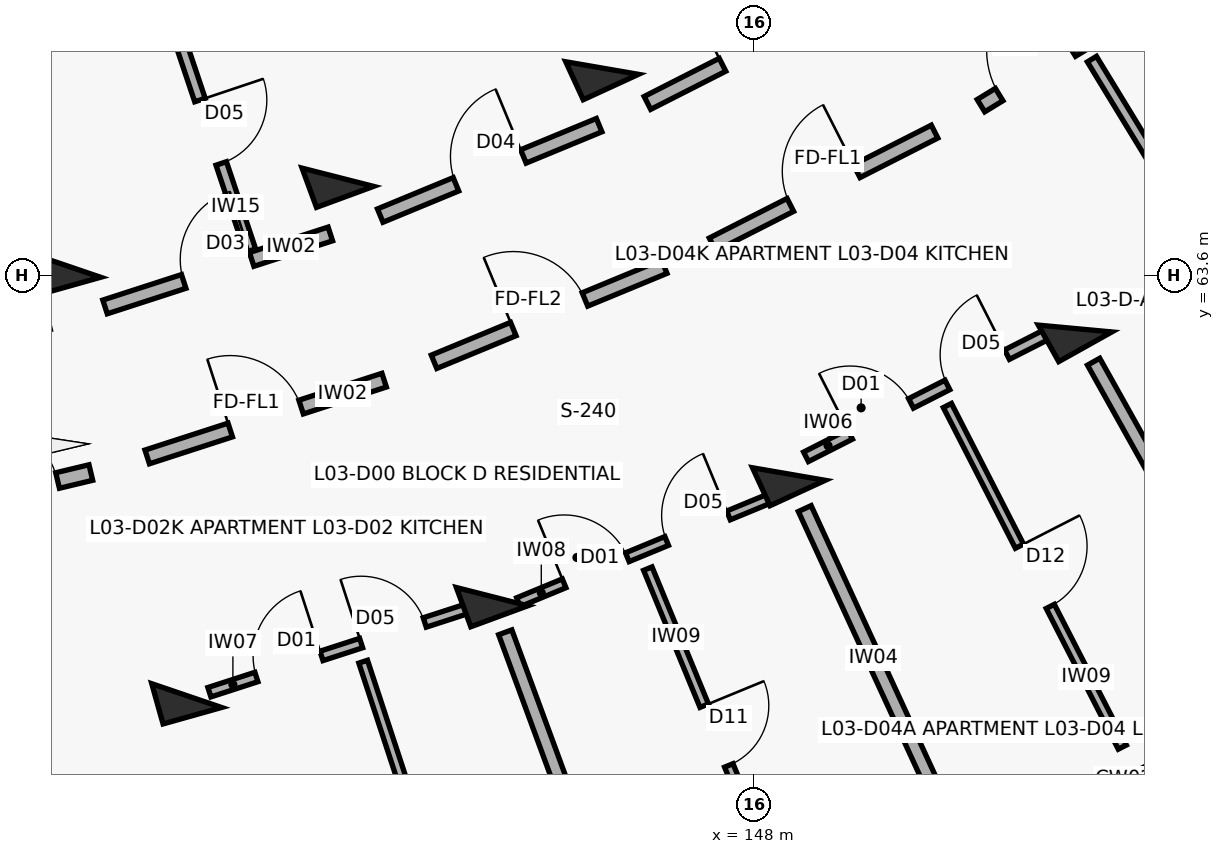
"""IFC4 building model, lengths in metres.
Left out: names, types, materials, properties, quantities, classifications, styles, units other than length and angle.
Written with IfcOpenShell. Run it as: python <this file> out.ifc"""

import sys

from ifc_helpers import new_model, si_unit, direction, frame, frame_2d, origin, origin_2d, place, context, subcontext, project, spatial, rectangle, extrude, element, fill, save


model = new_model("IFC4")
c1 = context("Model", 3, precision=1e-05, world=origin(), true_north=direction((0.0, 1.0)))
c2 = subcontext(c1, "Body", "Model", "MODEL_VIEW")
j1 = project(units=[si_unit("LENGTHUNIT", "METRE"), si_unit("PLANEANGLEUNIT", "RADIAN")], contexts=[c1])
p1 = place(None, origin())
s1 = spatial("IfcSite", under=j1, at=p1, CompositionType="ELEMENT")
p2 = place(p1, origin())
s2 = spatial("IfcBuilding", under=s1, at=p2, CompositionType="ELEMENT")
p3 = place(p2, frame((0.0, 0.0, 11.2)))
s3 = spatial("IfcBuildingStorey", under=s2, at=p3, CompositionType="ELEMENT", Elevation=11.2)
for number, where, z_axis, x_axis in (
    (1, (138.947, 63.728, 0.0), (0.0, 0.0, 1.0), (0.271, -0.963, 0.0)),
    (2, (140.538, 58.067, 0.0), (0.0, 0.0, 1.0), (0.271, -0.963, 0.0)),
    (3, (142.527, 64.887, 0.0), (0.0, 0.0, 1.0), (0.345, -0.938, 0.0)),
    (4, (144.557, 59.369, 0.0), (0.0, 0.0, 1.0), (0.345, -0.938, 0.0)),
    (5, (146.004, 66.324, 0.0), (0.0, 0.0, 1.0), (0.418, -0.909, 0.0)),
    (6, (148.461, 60.982, 0.0), (0.0, 0.0, 1.0), (0.418, -0.909, 0.0)),
    (7, (152.227, 62.897, 0.0), (0.0, 0.0, 1.0), (0.488, -0.873, 0.0)),
):
    element("IfcColumn", number, at=place(p3, frame(where, z_axis=z_axis, x_axis=x_axis)), inside=s3, PredefinedType="COLUMN", context=c2, shape_type="SweptSolid", body=[
        extrude(rectangle(XDim=0.55, YDim=0.8, at=origin_2d()), origin(), (0.0, 0.0, 1.0), 3.1),
    ])
p4 = place(p3, frame((136.227, 60.272, 0.0), z_axis=(0.0, 0.0, 1.0), x_axis=(0.972564346632, 0.232634029456, 0.0)))
e8 = element("IfcWall", 8, at=p4, inside=s3, PredefinedType="SOLIDWALL", context=c2, shape_type="SweptSolid", body=[
    extrude(rectangle(XDim=3.137, YDim=0.21, at=frame_2d((1.568, 0.0))), origin(), (0.0, 0.0, 1.0), 2.08),
])
p5 = place(p4, frame((0.45, 0.0, 0.0)))
e9 = element("IfcOpeningElement", 9, at=p5, cuts=e8, PredefinedType="OPENING", context=c2, shape_type="SweptSolid", body=[
    extrude(rectangle(XDim=1.1, YDim=2.15, at=frame_2d((0.55, 1.075))), frame((0.0, 0.115, 0.0), z_axis=(0.0, -1.0, 0.0), x_axis=(1.0, 0.0, 0.0)), (0.0, 0.0, 1.0), 0.23),
])
p6 = place(p4, frame((1.567, 0.0, 0.0)))
e10 = element("IfcOpeningElement", 10, at=p6, cuts=e8, PredefinedType="OPENING", context=c2, shape_type="SweptSolid", body=[
    extrude(rectangle(XDim=1.12, YDim=2.15, at=frame_2d((0.56, 1.075))), frame((0.0, 0.115, 0.0), z_axis=(0.0, -1.0, 0.0), x_axis=(1.0, 0.0, 0.0)), (0.0, 0.0, 1.0), 0.23),
])
p7 = place(p3, frame((140.019, 61.208, 0.0), z_axis=(0.0, 0.0, 1.0), x_axis=(0.951323803878, 0.308193154005, 0.0)))
e11 = element("IfcWall", 11, at=p7, inside=s3, PredefinedType="SOLIDWALL", context=c2, shape_type="SweptSolid", body=[
    extrude(rectangle(XDim=3.277, YDim=0.19, at=frame_2d((1.639, 0.0))), origin(), (0.0, 0.0, 1.0), 2.08),
])
p8 = place(p7, frame((1.148, 0.0, 0.0)))
e12 = element("IfcOpeningElement", 12, at=p8, cuts=e11, PredefinedType="OPENING", context=c2, shape_type="SweptSolid", body=[
    extrude(rectangle(XDim=0.98, YDim=2.15, at=frame_2d((0.49, 1.075))), frame((0.0, 0.105, 0.0), z_axis=(0.0, -1.0, 0.0), x_axis=(1.0, 0.0, 0.0)), (0.0, 0.0, 1.0), 0.21),
])
p9 = place(p3, frame((139.464, 63.181, 0.0), z_axis=(0.0, 0.0, 1.0), x_axis=(0.951336474448, 0.308154040027, 0.0)))
e13 = element("IfcWall", 13, at=p9, inside=s3, PredefinedType="SOLIDWALL", context=c2, shape_type="SweptSolid", body=[
    extrude(rectangle(XDim=3.116, YDim=0.19, at=frame_2d((1.558, 0.0))), origin(), (0.0, 0.0, 1.0), 2.08),
])
p10 = place(p9, frame((1.088, 0.0, 0.0)))
e14 = element("IfcOpeningElement", 14, at=p10, cuts=e13, PredefinedType="OPENING", context=c2, shape_type="SweptSolid", body=[
    extrude(rectangle(XDim=0.94, YDim=2.1, at=frame_2d((0.47, 1.05))), frame((0.0, 0.105, 0.0), z_axis=(0.0, -1.0, 0.0), x_axis=(1.0, 0.0, 0.0)), (0.0, 0.0, 1.0), 0.21),
])
p11 = place(p3, frame((140.328, 67.051, 0.0), z_axis=(0.0, 0.0, 1.0), x_axis=(0.317825321803, -0.948149284038, 0.0)))
e15 = element("IfcWall", 15, at=p11, inside=s3, PredefinedType="PARTITIONING", context=c2, shape_type="SweptSolid", body=[
    extrude(rectangle(XDim=3.3, YDim=0.145, at=frame_2d((1.65, 0.0))), origin(), (0.0, 0.0, 1.0), 2.08),
])
p12 = place(p11, frame((1.21, 0.0, 0.0)))
e16 = element("IfcOpeningElement", 16, at=p12, cuts=e15, PredefinedType="OPENING", context=c2, shape_type="SweptSolid", body=[
    extrude(rectangle(XDim=0.88, YDim=2.1, at=frame_2d((0.44, 1.05))), frame((0.0, 0.083, 0.0), z_axis=(0.0, -1.0, 0.0), x_axis=(1.0, 0.0, 0.0)), (0.0, 0.0, 1.0), 0.165),
])
p13 = place(p3, frame((140.837, 58.112, 0.0), z_axis=(0.0, 0.0, 1.0), x_axis=(0.951327366371, 0.308182157164, 0.0)))
e17 = element("IfcWall", 17, at=p13, inside=s3, PredefinedType="PARTITIONING", context=c2, shape_type="SweptSolid", body=[
    extrude(rectangle(XDim=3.628, YDim=0.13, at=frame_2d((1.814, 0.0))), origin(), (0.0, 0.0, 1.0), 2.08),
])
p14 = place(p13, frame((0.65, 0.0, 0.0)))
e18 = element("IfcOpeningElement", 18, at=p14, cuts=e17, PredefinedType="OPENING", context=c2, shape_type="SweptSolid", body=[
    extrude(rectangle(XDim=0.9, YDim=2.1, at=frame_2d((0.45, 1.05))), frame((0.0, 0.075, 0.0), z_axis=(0.0, -1.0, 0.0), x_axis=(1.0, 0.0, 0.0)), (0.0, 0.0, 1.0), 0.15),
])
p15 = place(p13, frame((2.098, 0.0, 0.0)))
e19 = element("IfcOpeningElement", 19, at=p15, cuts=e17, PredefinedType="OPENING", context=c2, shape_type="SweptSolid", body=[
    extrude(rectangle(XDim=0.88, YDim=2.1, at=frame_2d((0.44, 1.05))), frame((0.0, 0.075, 0.0), z_axis=(0.0, -1.0, 0.0), x_axis=(1.0, 0.0, 0.0)), (0.0, 0.0, 1.0), 0.15),
])
p16 = place(p3, frame((142.86, 58.513, 0.0), z_axis=(0.0, 0.0, 1.0), x_axis=(0.312308755556, -0.949980653068, 0.0)))
e20 = element("IfcWall", 20, at=p16, inside=s3, PredefinedType="PARTITIONING", context=c2, shape_type="SweptSolid", body=[
    extrude(rectangle(XDim=4.9, YDim=0.12, at=frame_2d((2.45, 0.0))), origin(), (0.0, 0.0, 1.0), 2.08),
])
p17 = place(p16, frame((1.97, 0.0, 0.0)))
e21 = element("IfcOpeningElement", 21, at=p17, cuts=e20, PredefinedType="OPENING", context=c2, shape_type="SweptSolid", body=[
    extrude(rectangle(XDim=0.96, YDim=2.1, at=frame_2d((0.48, 1.05))), frame((0.0, 0.07, 0.0), z_axis=(0.0, -1.0, 0.0), x_axis=(1.0, 0.0, 0.0)), (0.0, 0.0, 1.0), 0.14),
])
p18 = place(p3, frame((143.793, 62.459, 0.0), z_axis=(0.0, 0.0, 1.0), x_axis=(0.924214561665, 0.381873596896, 0.0)))
e22 = element("IfcWall", 22, at=p18, inside=s3, PredefinedType="SOLIDWALL", context=c2, shape_type="SweptSolid", body=[
    extrude(rectangle(XDim=3.277, YDim=0.19, at=frame_2d((1.639, 0.0))), origin(), (0.0, 0.0, 1.0), 2.08),
])
p19 = place(p18, frame((1.128, 0.0, 0.0)))
e23 = element("IfcOpeningElement", 23, at=p19, cuts=e22, PredefinedType="OPENING", context=c2, shape_type="SweptSolid", body=[
    extrude(rectangle(XDim=1.02, YDim=2.15, at=frame_2d((0.51, 1.075))), frame((0.0, 0.105, 0.0), z_axis=(0.0, -1.0, 0.0), x_axis=(1.0, 0.0, 0.0)), (0.0, 0.0, 1.0), 0.21),
])
p20 = place(p3, frame((143.085, 64.383, 0.0), z_axis=(0.0, 0.0, 1.0), x_axis=(0.924213340202, 0.381876553081, 0.0)))
e24 = element("IfcWall", 24, at=p20, inside=s3, PredefinedType="SOLIDWALL", context=c2, shape_type="SweptSolid", body=[
    extrude(rectangle(XDim=3.116, YDim=0.19, at=frame_2d((1.558, 0.0))), origin(), (0.0, 0.0, 1.0), 2.08),
])
p21 = place(p20, frame((1.078, 0.0, 0.0)))
e25 = element("IfcOpeningElement", 25, at=p21, cuts=e24, PredefinedType="OPENING", context=c2, shape_type="SweptSolid", body=[
    extrude(rectangle(XDim=0.96, YDim=2.1, at=frame_2d((0.48, 1.05))), frame((0.0, 0.105, 0.0), z_axis=(0.0, -1.0, 0.0), x_axis=(1.0, 0.0, 0.0)), (0.0, 0.0, 1.0), 0.21),
])
p22 = place(p3, frame((144.903, 59.296, 0.0), z_axis=(0.0, 0.0, 1.0), x_axis=(0.924207914011, 0.381889685223, 0.0)))
e26 = element("IfcWall", 26, at=p22, inside=s3, PredefinedType="PARTITIONING", context=c2, shape_type="SweptSolid", body=[
    extrude(rectangle(XDim=3.64, YDim=0.125, at=frame_2d((1.82, 0.0))), origin(), (0.0, 0.0, 1.0), 2.08),
])
p23 = place(p22, frame((0.65, 0.0, 0.0)))
e27 = element("IfcOpeningElement", 27, at=p23, cuts=e26, PredefinedType="OPENING", context=c2, shape_type="SweptSolid", body=[
    extrude(rectangle(XDim=0.9, YDim=2.1, at=frame_2d((0.45, 1.05))), frame((0.0, 0.073, 0.0), z_axis=(0.0, -1.0, 0.0), x_axis=(1.0, 0.0, 0.0)), (0.0, 0.0, 1.0), 0.145),
])
p24 = place(p22, frame((2.11, 0.0, 0.0)))
e28 = element("IfcOpeningElement", 28, at=p24, cuts=e26, PredefinedType="OPENING", context=c2, shape_type="SweptSolid", body=[
    extrude(rectangle(XDim=0.88, YDim=2.1, at=frame_2d((0.44, 1.05))), frame((0.0, 0.073, 0.0), z_axis=(0.0, -1.0, 0.0), x_axis=(1.0, 0.0, 0.0)), (0.0, 0.0, 1.0), 0.145),
])
p25 = place(p3, frame((146.605, 59.738, 0.0), z_axis=(0.0, 0.0, 1.0), x_axis=(0.380553327256, -0.924758976769, 0.0)))
e29 = element("IfcWall", 29, at=p25, inside=s3, PredefinedType="PARTITIONING", context=c2, shape_type="SweptSolid", body=[
    extrude(rectangle(XDim=4.75, YDim=0.12, at=frame_2d((2.375, 0.0))), origin(), (0.0, 0.0, 1.0), 2.08),
])
p26 = place(p25, frame((1.95, 0.0, 0.0)))
e30 = element("IfcOpeningElement", 30, at=p26, cuts=e29, PredefinedType="OPENING", context=c2, shape_type="SweptSolid", body=[
    extrude(rectangle(XDim=0.85, YDim=2.1, at=frame_2d((0.425, 1.05))), frame((0.0, 0.07, 0.0), z_axis=(0.0, -1.0, 0.0), x_axis=(1.0, 0.0, 0.0)), (0.0, 0.0, 1.0), 0.14),
])
p27 = place(p3, frame((144.73, 58.9, 0.0), z_axis=(0.0, 0.0, 1.0), x_axis=(0.345273579683, -0.938502080537, 0.0)))
e31 = element("IfcWall", 31, at=p27, inside=s3, PredefinedType="SOLIDWALL", context=c2, shape_type="SweptSolid", body=[
    extrude(rectangle(XDim=4.35, YDim=0.185, at=frame_2d((2.175, 0.0))), origin(), (0.0, 0.0, 1.0), 2.08),
])
p28 = place(p3, frame((147.457, 64.003, 0.0), z_axis=(0.0, 0.0, 1.0), x_axis=(0.891412167565, 0.45319349898, 0.0)))
e32 = element("IfcWall", 32, at=p28, inside=s3, PredefinedType="SOLIDWALL", context=c2, shape_type="SweptSolid", body=[
    extrude(rectangle(XDim=3.277, YDim=0.19, at=frame_2d((1.639, 0.0))), origin(), (0.0, 0.0, 1.0), 2.08),
])
p29 = place(p28, frame((1.148, 0.0, 0.0)))
e33 = element("IfcOpeningElement", 33, at=p29, cuts=e32, PredefinedType="OPENING", context=c2, shape_type="SweptSolid", body=[
    extrude(rectangle(XDim=0.98, YDim=2.15, at=frame_2d((0.49, 1.075))), frame((0.0, 0.105, 0.0), z_axis=(0.0, -1.0, 0.0), x_axis=(1.0, 0.0, 0.0)), (0.0, 0.0, 1.0), 0.21),
])
p30 = place(p3, frame((146.6, 65.865, 0.0), z_axis=(0.0, 0.0, 1.0), x_axis=(0.891414101388, 0.453189695212, 0.0)))
e34 = element("IfcWall", 34, at=p30, inside=s3, PredefinedType="SOLIDWALL", context=c2, shape_type="SweptSolid", body=[
    extrude(rectangle(XDim=3.116, YDim=0.19, at=frame_2d((1.558, 0.0))), origin(), (0.0, 0.0, 1.0), 2.08),
])
p31 = place(p30, frame((1.108, 0.0, 0.0)))
e35 = element("IfcOpeningElement", 35, at=p31, cuts=e34, PredefinedType="OPENING", context=c2, shape_type="SweptSolid", body=[
    extrude(rectangle(XDim=0.9, YDim=2.1, at=frame_2d((0.45, 1.05))), frame((0.0, 0.105, 0.0), z_axis=(0.0, -1.0, 0.0), x_axis=(1.0, 0.0, 0.0)), (0.0, 0.0, 1.0), 0.21),
])
p32 = place(p3, frame((148.687, 61.209, 0.0), z_axis=(0.0, 0.0, 1.0), x_axis=(0.891396224028, 0.453224857866, 0.0)))
e36 = element("IfcWall", 36, at=p32, inside=s3, PredefinedType="PARTITIONING", context=c2, shape_type="SweptSolid", body=[
    extrude(rectangle(XDim=3.617, YDim=0.14, at=frame_2d((1.808, 0.0))), origin(), (0.0, 0.0, 1.0), 2.08),
])
p33 = place(p32, frame((0.65, 0.0, 0.0)))
e37 = element("IfcOpeningElement", 37, at=p33, cuts=e36, PredefinedType="OPENING", context=c2, shape_type="SweptSolid", body=[
    extrude(rectangle(XDim=0.9, YDim=2.1, at=frame_2d((0.45, 1.05))), frame((0.0, 0.08, 0.0), z_axis=(0.0, -1.0, 0.0), x_axis=(1.0, 0.0, 0.0)), (0.0, 0.0, 1.0), 0.16),
])
p34 = place(p32, frame((2.086, 0.0, 0.0)))
e38 = element("IfcOpeningElement", 38, at=p34, cuts=e36, PredefinedType="OPENING", context=c2, shape_type="SweptSolid", body=[
    extrude(rectangle(XDim=0.88, YDim=2.1, at=frame_2d((0.44, 1.05))), frame((0.0, 0.08, 0.0), z_axis=(0.0, -1.0, 0.0), x_axis=(1.0, 0.0, 0.0)), (0.0, 0.0, 1.0), 0.16),
])
p35 = place(p3, frame((150.547, 61.884, 0.0), z_axis=(0.0, 0.0, 1.0), x_axis=(0.455778725258, -0.89009311513, 0.0)))
e39 = element("IfcWall", 39, at=p35, inside=s3, PredefinedType="PARTITIONING", context=c2, shape_type="SweptSolid", body=[
    extrude(rectangle(XDim=5.05, YDim=0.12, at=frame_2d((2.525, 0.0))), origin(), (0.0, 0.0, 1.0), 2.08),
])
p36 = place(p35, frame((2.08, 0.0, 0.0)))
e40 = element("IfcOpeningElement", 40, at=p36, cuts=e39, PredefinedType="OPENING", context=c2, shape_type="SweptSolid", body=[
    extrude(rectangle(XDim=0.89, YDim=2.1, at=frame_2d((0.445, 1.05))), frame((0.0, 0.07, 0.0), z_axis=(0.0, -1.0, 0.0), x_axis=(1.0, 0.0, 0.0)), (0.0, 0.0, 1.0), 0.14),
])
p37 = place(p3, frame((148.67, 60.528, 0.0), z_axis=(0.0, 0.0, 1.0), x_axis=(0.417837051164, -0.908521985796, 0.0)))
e41 = element("IfcWall", 41, at=p37, inside=s3, PredefinedType="SOLIDWALL", context=c2, shape_type="SweptSolid", body=[
    extrude(rectangle(XDim=4.35, YDim=0.185, at=frame_2d((2.175, 0.0))), origin(), (0.0, 0.0, 1.0), 2.08),
])
p38 = place(p3, frame((150.989, 65.829, 0.0), z_axis=(0.0, 0.0, 1.0), x_axis=(0.853090237845, 0.521763400492, 0.0)))
e42 = element("IfcWall", 42, at=p38, inside=s3, PredefinedType="SOLIDWALL", context=c2, shape_type="SweptSolid", body=[
    extrude(rectangle(XDim=3.277, YDim=0.19, at=frame_2d((1.638, 0.0))), origin(), (0.0, 0.0, 1.0), 2.08),
])
p39 = place(p38, frame((0.28, 0.0, 0.0)))
e43 = element("IfcOpeningElement", 43, at=p39, cuts=e42, PredefinedType="OPENING", context=c2, shape_type="SweptSolid", body=[
    extrude(rectangle(XDim=1.12, YDim=2.15, at=frame_2d((0.56, 1.075))), frame((0.0, 0.105, 0.0), z_axis=(0.0, -1.0, 0.0), x_axis=(1.0, 0.0, 0.0)), (0.0, 0.0, 1.0), 0.21),
])
p40 = place(p38, frame((2.107, 0.0, 0.0)))
e44 = element("IfcOpeningElement", 44, at=p40, cuts=e42, PredefinedType="OPENING", context=c2, shape_type="SweptSolid", body=[
    extrude(rectangle(XDim=0.95, YDim=2.1, at=frame_2d((0.475, 1.05))), frame((0.0, 0.105, 0.0), z_axis=(0.0, -1.0, 0.0), x_axis=(1.0, 0.0, 0.0)), (0.0, 0.0, 1.0), 0.21),
])
p41 = place(p3, frame((152.448, 66.442, 0.0), z_axis=(0.0, 0.0, 1.0), x_axis=(0.520511872578, -0.853854431683, 0.0)))
e45 = element("IfcWall", 45, at=p41, inside=s3, PredefinedType="PARTITIONING", context=c2, shape_type="SweptSolid", body=[
    extrude(rectangle(XDim=7.95, YDim=0.14, at=frame_2d((3.975, 0.0))), origin(), (0.0, 0.0, 1.0), 2.08),
])
p42 = place(p41, frame((6.05, 0.0, 0.0)))
e46 = element("IfcOpeningElement", 46, at=p42, cuts=e45, PredefinedType="OPENING", context=c2, shape_type="SweptSolid", body=[
    extrude(rectangle(XDim=0.92, YDim=2.1, at=frame_2d((0.46, 1.05))), frame((0.0, 0.08, 0.0), z_axis=(0.0, -1.0, 0.0), x_axis=(1.0, 0.0, 0.0)), (0.0, 0.0, 1.0), 0.16),
])
p43 = place(p3, frame((152.471, 62.46, 0.0), z_axis=(0.0, 0.0, 1.0), x_axis=(0.487866639184, -0.872918176218, 0.0)))
e47 = element("IfcWall", 47, at=p43, inside=s3, PredefinedType="SOLIDWALL", context=c2, shape_type="SweptSolid", body=[
    extrude(rectangle(XDim=4.35, YDim=0.185, at=frame_2d((2.175, 0.0))), origin(), (0.0, 0.0, 1.0), 2.08),
])
p44 = place(p6, origin())
e48 = element("IfcDoor", 48, at=p44, inside=s3, OperationType="SINGLE_SWING_LEFT", PredefinedType="DOOR", context=c2, shape_type="SweptSolid", body=[
    extrude(rectangle(XDim=1.12, YDim=2.15, at=frame_2d((0.56, 1.075))), frame((0.0, 0.025, 0.0), z_axis=(0.0, -1.0, 0.0), x_axis=(1.0, 0.0, 0.0)), (0.0, 0.0, 1.0), 0.05),
])
fill(e10, e48)
p45 = place(p8, origin())
e49 = element("IfcDoor", 49, at=p45, inside=s3, OperationType="SINGLE_SWING_LEFT", PredefinedType="DOOR", context=c2, shape_type="SweptSolid", body=[
    extrude(rectangle(XDim=0.98, YDim=2.15, at=frame_2d((0.49, 1.075))), frame((0.0, 0.025, 0.0), z_axis=(0.0, -1.0, 0.0), x_axis=(1.0, 0.0, 0.0)), (0.0, 0.0, 1.0), 0.05),
])
fill(e12, e49)
p46 = place(p10, origin())
e50 = element("IfcDoor", 50, at=p46, inside=s3, OperationType="SINGLE_SWING_RIGHT", PredefinedType="DOOR", context=c2, shape_type="SweptSolid", body=[
    extrude(rectangle(XDim=0.94, YDim=2.1, at=frame_2d((0.47, 1.05))), frame((0.0, 0.025, 0.0), z_axis=(0.0, -1.0, 0.0), x_axis=(1.0, 0.0, 0.0)), (0.0, 0.0, 1.0), 0.05),
])
fill(e14, e50)
p47 = place(p12, origin())
e51 = element("IfcDoor", 51, at=p47, inside=s3, OperationType="SINGLE_SWING_LEFT", PredefinedType="DOOR", context=c2, shape_type="SweptSolid", body=[
    extrude(rectangle(XDim=0.88, YDim=2.1, at=frame_2d((0.44, 1.05))), frame((0.0, 0.025, 0.0), z_axis=(0.0, -1.0, 0.0), x_axis=(1.0, 0.0, 0.0)), (0.0, 0.0, 1.0), 0.05),
])
fill(e16, e51)
p48 = place(p14, origin())
e52 = element("IfcDoor", 52, at=p48, inside=s3, OperationType="SINGLE_SWING_RIGHT", PredefinedType="DOOR", context=c2, shape_type="SweptSolid", body=[
    extrude(rectangle(XDim=0.9, YDim=2.1, at=frame_2d((0.45, 1.05))), frame((0.0, 0.025, 0.0), z_axis=(0.0, -1.0, 0.0), x_axis=(1.0, 0.0, 0.0)), (0.0, 0.0, 1.0), 0.05),
])
fill(e18, e52)
p49 = place(p15, origin())
e53 = element("IfcDoor", 53, at=p49, inside=s3, OperationType="SINGLE_SWING_LEFT", PredefinedType="DOOR", context=c2, shape_type="SweptSolid", body=[
    extrude(rectangle(XDim=0.88, YDim=2.1, at=frame_2d((0.44, 1.05))), frame((0.0, 0.025, 0.0), z_axis=(0.0, -1.0, 0.0), x_axis=(1.0, 0.0, 0.0)), (0.0, 0.0, 1.0), 0.05),
])
fill(e19, e53)
p50 = place(p19, origin())
e54 = element("IfcDoor", 54, at=p50, inside=s3, OperationType="SINGLE_SWING_LEFT", PredefinedType="DOOR", context=c2, shape_type="SweptSolid", body=[
    extrude(rectangle(XDim=1.02, YDim=2.15, at=frame_2d((0.51, 1.075))), frame((0.0, 0.025, 0.0), z_axis=(0.0, -1.0, 0.0), x_axis=(1.0, 0.0, 0.0)), (0.0, 0.0, 1.0), 0.05),
])
fill(e23, e54)
p51 = place(p21, origin())
e55 = element("IfcDoor", 55, at=p51, inside=s3, OperationType="SINGLE_SWING_RIGHT", PredefinedType="DOOR", context=c2, shape_type="SweptSolid", body=[
    extrude(rectangle(XDim=0.96, YDim=2.1, at=frame_2d((0.48, 1.05))), frame((0.0, 0.025, 0.0), z_axis=(0.0, -1.0, 0.0), x_axis=(1.0, 0.0, 0.0)), (0.0, 0.0, 1.0), 0.05),
])
fill(e25, e55)
p52 = place(p23, origin())
e56 = element("IfcDoor", 56, at=p52, inside=s3, OperationType="SINGLE_SWING_LEFT", PredefinedType="DOOR", context=c2, shape_type="SweptSolid", body=[
    extrude(rectangle(XDim=0.9, YDim=2.1, at=frame_2d((0.45, 1.05))), frame((0.0, 0.025, 0.0), z_axis=(0.0, -1.0, 0.0), x_axis=(1.0, 0.0, 0.0)), (0.0, 0.0, 1.0), 0.05),
])
fill(e27, e56)
p53 = place(p24, origin())
e57 = element("IfcDoor", 57, at=p53, inside=s3, OperationType="SINGLE_SWING_RIGHT", PredefinedType="DOOR", context=c2, shape_type="SweptSolid", body=[
    extrude(rectangle(XDim=0.88, YDim=2.1, at=frame_2d((0.44, 1.05))), frame((0.0, 0.025, 0.0), z_axis=(0.0, -1.0, 0.0), x_axis=(1.0, 0.0, 0.0)), (0.0, 0.0, 1.0), 0.05),
])
fill(e28, e57)
p54 = place(p26, origin())
e58 = element("IfcDoor", 58, at=p54, inside=s3, OperationType="SINGLE_SWING_LEFT", PredefinedType="DOOR", context=c2, shape_type="SweptSolid", body=[
    extrude(rectangle(XDim=0.85, YDim=2.1, at=frame_2d((0.425, 1.05))), frame((0.0, 0.025, 0.0), z_axis=(0.0, -1.0, 0.0), x_axis=(1.0, 0.0, 0.0)), (0.0, 0.0, 1.0), 0.05),
])
fill(e30, e58)
p55 = place(p29, origin())
e59 = element("IfcDoor", 59, at=p55, inside=s3, OperationType="SINGLE_SWING_RIGHT", PredefinedType="DOOR", context=c2, shape_type="SweptSolid", body=[
    extrude(rectangle(XDim=0.98, YDim=2.15, at=frame_2d((0.49, 1.075))), frame((0.0, 0.025, 0.0), z_axis=(0.0, -1.0, 0.0), x_axis=(1.0, 0.0, 0.0)), (0.0, 0.0, 1.0), 0.05),
])
fill(e33, e59)
p56 = place(p31, origin())
e60 = element("IfcDoor", 60, at=p56, inside=s3, OperationType="SINGLE_SWING_LEFT", PredefinedType="DOOR", context=c2, shape_type="SweptSolid", body=[
    extrude(rectangle(XDim=0.9, YDim=2.1, at=frame_2d((0.45, 1.05))), frame((0.0, 0.025, 0.0), z_axis=(0.0, -1.0, 0.0), x_axis=(1.0, 0.0, 0.0)), (0.0, 0.0, 1.0), 0.05),
])
fill(e35, e60)
p57 = place(p33, origin())
e61 = element("IfcDoor", 61, at=p57, inside=s3, OperationType="SINGLE_SWING_LEFT", PredefinedType="DOOR", context=c2, shape_type="SweptSolid", body=[
    extrude(rectangle(XDim=0.9, YDim=2.1, at=frame_2d((0.45, 1.05))), frame((0.0, 0.025, 0.0), z_axis=(0.0, -1.0, 0.0), x_axis=(1.0, 0.0, 0.0)), (0.0, 0.0, 1.0), 0.05),
])
fill(e37, e61)
p58 = place(p34, origin())
e62 = element("IfcDoor", 62, at=p58, inside=s3, OperationType="SINGLE_SWING_RIGHT", PredefinedType="DOOR", context=c2, shape_type="SweptSolid", body=[
    extrude(rectangle(XDim=0.88, YDim=2.1, at=frame_2d((0.44, 1.05))), frame((0.0, 0.025, 0.0), z_axis=(0.0, -1.0, 0.0), x_axis=(1.0, 0.0, 0.0)), (0.0, 0.0, 1.0), 0.05),
])
fill(e38, e62)
p59 = place(p36, origin())
e63 = element("IfcDoor", 63, at=p59, inside=s3, OperationType="SINGLE_SWING_LEFT", PredefinedType="DOOR", context=c2, shape_type="SweptSolid", body=[
    extrude(rectangle(XDim=0.89, YDim=2.1, at=frame_2d((0.445, 1.05))), frame((0.0, 0.025, 0.0), z_axis=(0.0, -1.0, 0.0), x_axis=(1.0, 0.0, 0.0)), (0.0, 0.0, 1.0), 0.05),
])
fill(e40, e63)
p60 = place(p39, origin())
e64 = element("IfcDoor", 64, at=p60, inside=s3, OperationType="SINGLE_SWING_RIGHT", PredefinedType="DOOR", context=c2, shape_type="SweptSolid", body=[
    extrude(rectangle(XDim=1.12, YDim=2.15, at=frame_2d((0.56, 1.075))), frame((0.0, 0.025, 0.0), z_axis=(0.0, -1.0, 0.0), x_axis=(1.0, 0.0, 0.0)), (0.0, 0.0, 1.0), 0.05),
])
fill(e43, e64)
save(model, sys.argv[1])
